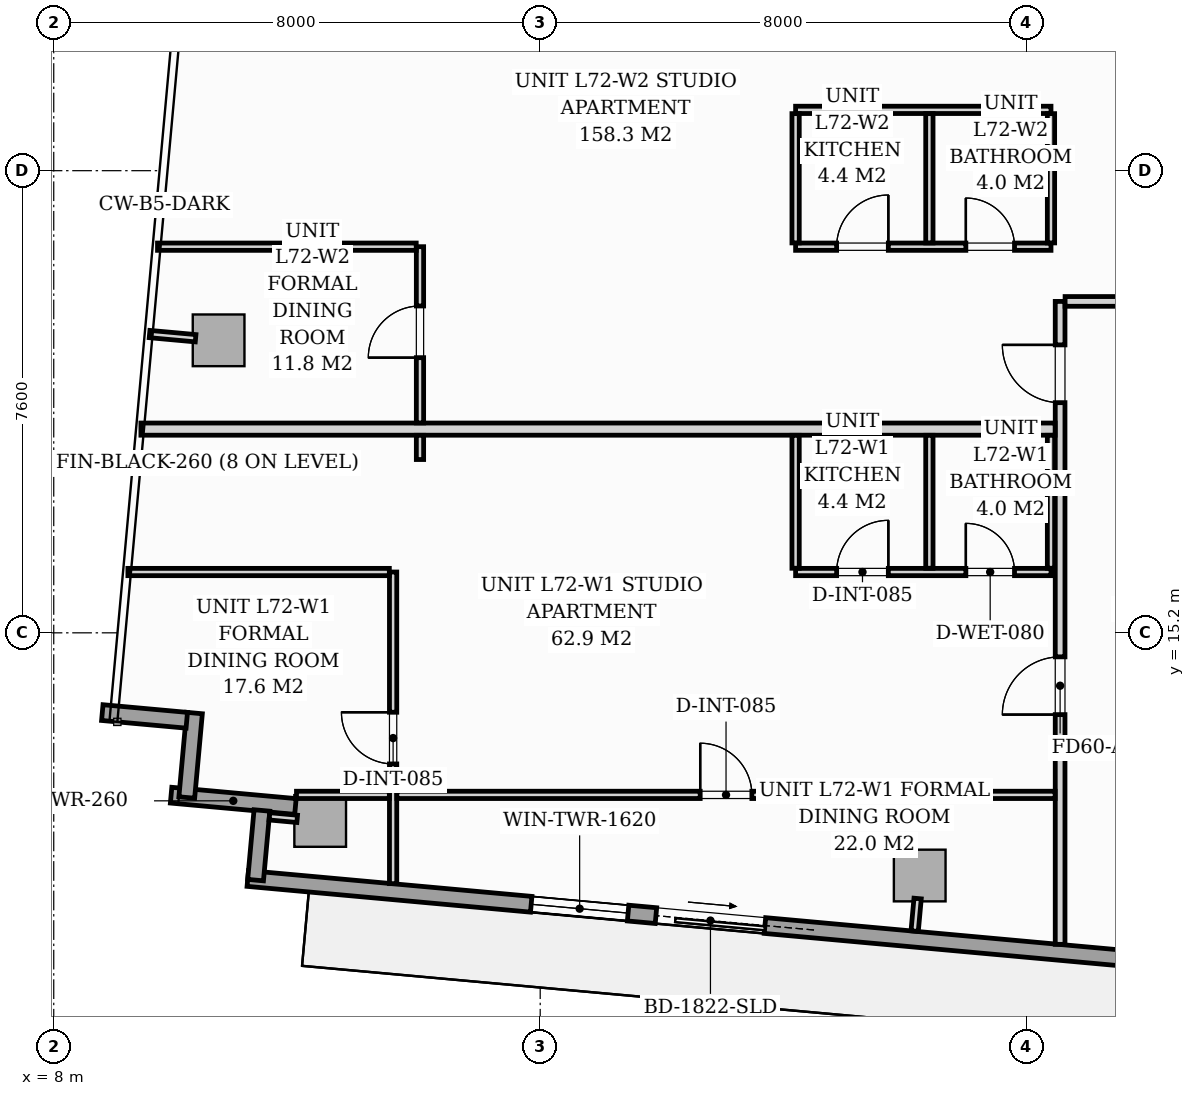
"""IFC4 building model, lengths in metres.
Left out: names, types, materials, properties, quantities, classifications, styles, units other than length and angle.
Written with IfcOpenShell. Run it as: python <this file> out.ifc"""

import sys

from ifc_helpers import new_model, si_unit, direction, frame, frame_2d, origin, origin_2d, place, context, subcontext, project, spatial, rectangle, extrude, source, transform, mapped, element, fill, save


model = new_model("IFC4")
c1 = context("Model", 3, precision=1e-05, world=origin(), true_north=direction((0.0, 1.0)))
c2 = subcontext(c1, "Body", "Model", "MODEL_VIEW")
j1 = project(units=[si_unit("LENGTHUNIT", "METRE"), si_unit("PLANEANGLEUNIT", "RADIAN")], contexts=[c1])
p1 = place(None, origin())
s1 = spatial("IfcSite", under=j1, at=p1, CompositionType="ELEMENT")
p2 = place(p1, origin())
s2 = spatial("IfcBuilding", under=s1, at=p2, CompositionType="ELEMENT")
p3 = place(p2, frame((0.0, 0.0, 249.6)))
s3 = spatial("IfcBuildingStorey", under=s2, at=p3, CompositionType="ELEMENT", Elevation=249.6)
m1 = source(origin(), c2, "Body", "SweptSolid", [
    extrude(rectangle(XDim=0.85, YDim=0.85, at=origin_2d()), origin(), (0.0, 0.0, 1.0), 3.296),
])
for number, where, z_axis, x_axis in (
    (1, (12.382, 12.106, 0.002), (0.0, 0.0, 1.0), (0.996, -0.091, 0.0)),
    (2, (22.241, 11.209, 0.002), (0.0, 0.0, 1.0), (0.996, -0.091, 0.0)),
    (3, (10.711, 20.01, 0.002), (0.0, 0.0, 1.0), (0.996, -0.091, 0.0)),
):
    element("IfcColumn", number, at=place(p3, frame(where, z_axis=z_axis, x_axis=x_axis)), inside=s3, PredefinedType="COLUMN", context=c2, shape_type="MappedRepresentation", body=[
        mapped(m1, transform((0.0, 0.0, 0.0), scale=1.0)),
    ])
p4 = place(p3, frame((11.975, 12.344, 0.0), z_axis=(0.0, 0.0, 1.0), x_axis=(-0.995885404354, 0.090621528316, 0.0)))
e4 = element("IfcWall", 4, at=p4, inside=s3, PredefinedType="STANDARD", context=c2, shape_type="SweptSolid", body=[
    extrude(rectangle(XDim=2.053, YDim=0.26, at=frame_2d((1.026, 0.0))), origin(), (0.0, 0.0, 1.0), 3.04),
])
p5 = place(p3, frame((10.188, 12.492, 0.0), z_axis=(0.0, 0.0, 1.0), x_axis=(0.090646191665, 0.995883159782, 0.0)))
e5 = element("IfcWall", 5, at=p5, inside=s3, PredefinedType="STANDARD", context=c2, shape_type="SweptSolid", body=[
    extrude(rectangle(XDim=1.395, YDim=0.26, at=frame_2d((0.698, 0.0))), origin(), (0.0, 0.0, 1.0), 3.04),
])
p6 = place(p3, frame((10.188, 13.762, 0.0), z_axis=(0.0, 0.0, 1.0), x_axis=(-0.995881721538, 0.090661991521, 0.0)))
e6 = element("IfcWall", 6, at=p6, inside=s3, PredefinedType="STANDARD", context=c2, shape_type="SweptSolid", body=[
    extrude(rectangle(XDim=1.395, YDim=0.26, at=frame_2d((0.698, 0.0))), origin(), (0.0, 0.0, 1.0), 3.04),
])
p7 = place(p3, frame((25.761, 9.834, 0.0), z_axis=(0.0, 0.0, 1.0), x_axis=(-0.995884584572, 0.090630536861, 0.0)))
e7 = element("IfcWall", 7, at=p7, inside=s3, PredefinedType="STANDARD", context=c2, shape_type="SweptSolid", body=[
    extrude(rectangle(XDim=14.63, YDim=0.26, at=frame_2d((7.315, 0.0))), origin(), (0.0, 0.0, 1.0), 3.04),
])
p8 = place(p7, frame((6.09, 0.0, 0.0)))
e8 = element("IfcOpeningElement", 8, at=p8, cuts=e7, PredefinedType="OPENING", context=c2, shape_type="SweptSolid", body=[
    extrude(rectangle(XDim=1.8, YDim=2.06, at=frame_2d((0.9, 1.03))), frame((0.0, 0.14, 0.0), z_axis=(0.0, -1.0, 0.0), x_axis=(1.0, 0.0, 0.0)), (0.0, 0.0, 1.0), 0.28),
])
p9 = place(p7, frame((8.35, 0.0, 0.65)))
e9 = element("IfcOpeningElement", 9, at=p9, cuts=e7, PredefinedType="OPENING", context=c2, shape_type="SweptSolid", body=[
    extrude(rectangle(XDim=1.6, YDim=1.5, at=frame_2d((0.8, 0.75))), frame((0.0, 0.14, 0.0), z_axis=(0.0, -1.0, 0.0), x_axis=(1.0, 0.0, 0.0)), (0.0, 0.0, 1.0), 0.28),
])
p10 = place(p3, frame((11.319, 11.134, 0.0), z_axis=(0.0, 0.0, 1.0), x_axis=(0.090650594353, 0.995882759035, 0.0)))
e10 = element("IfcWall", 10, at=p10, inside=s3, PredefinedType="STANDARD", context=c2, shape_type="SweptSolid", body=[
    extrude(rectangle(XDim=1.15, YDim=0.26, at=frame_2d((0.575, 0.0))), origin(), (0.0, 0.0, 1.0), 3.04),
])
p11 = place(p3, frame((24.55, 13.28, 0.0), z_axis=(0.0, 0.0, 1.0), x_axis=(1.0, 0.0, 0.0)))
e11 = element("IfcWall", 11, at=p11, inside=s3, PredefinedType="PARTITIONING", context=c2, shape_type="SweptSolid", body=[
    extrude(rectangle(XDim=22.9, YDim=0.16, at=frame_2d((11.45, 0.0))), origin(), (0.0, 0.0, 1.0), 2.596),
])
p12 = place(p11, frame((7.125, 0.0, 0.0)))
e12 = element("IfcOpeningElement", 12, at=p12, cuts=e11, PredefinedType="OPENING", context=c2, shape_type="SweptSolid", body=[
    extrude(rectangle(XDim=0.95, YDim=2.06, at=frame_2d((0.475, 1.03))), frame((0.0, 0.09, 0.0), z_axis=(0.0, -1.0, 0.0), x_axis=(1.0, 0.0, 0.0)), (0.0, 0.0, 1.0), 0.18),
])
p13 = place(p3, frame((24.55, 10.077, 0.0), z_axis=(0.0, 0.0, 1.0), x_axis=(0.0, 1.0, 0.0)))
e13 = element("IfcWall", 13, at=p13, inside=s3, PredefinedType="PARTITIONING", context=c2, shape_type="SweptSolid", body=[
    extrude(rectangle(XDim=3.121, YDim=0.16, at=frame_2d((1.561, 0.0))), origin(), (0.0, 0.0, 1.0), 3.04),
])
p14 = place(p3, frame((24.55, 13.362, 0.0), z_axis=(0.0, 0.0, 1.0), x_axis=(0.0, 1.0, 0.0)))
e14 = element("IfcWall", 14, at=p14, inside=s3, PredefinedType="PARTITIONING", context=c2, shape_type="SweptSolid", body=[
    extrude(rectangle(XDim=7.288, YDim=0.16, at=frame_2d((3.644, 0.0))), origin(), (0.0, 0.0, 1.0), 3.04),
])
p15 = place(p14, frame((0.493, 0.0, 0.0)))
e15 = element("IfcOpeningElement", 15, at=p15, cuts=e14, PredefinedType="OPENING", context=c2, shape_type="SweptSolid", body=[
    extrude(rectangle(XDim=0.95, YDim=2.06, at=frame_2d((0.475, 1.03))), frame((0.0, 0.09, 0.0), z_axis=(0.0, -1.0, 0.0), x_axis=(1.0, 0.0, 0.0)), (0.0, 0.0, 1.0), 0.18),
])
p16 = place(p14, frame((5.623, 0.0, 0.0)))
e16 = element("IfcOpeningElement", 16, at=p16, cuts=e14, PredefinedType="OPENING", context=c2, shape_type="SweptSolid", body=[
    extrude(rectangle(XDim=0.95, YDim=2.06, at=frame_2d((0.475, 1.03))), frame((0.0, 0.09, 0.0), z_axis=(0.0, -1.0, 0.0), x_axis=(1.0, 0.0, 0.0)), (0.0, 0.0, 1.0), 0.18),
])
p17 = place(p3, frame((24.632, 20.65, 0.0), z_axis=(0.0, 0.0, 1.0), x_axis=(1.0, 0.0, 0.0)))
e17 = element("IfcWall", 17, at=p17, inside=s3, PredefinedType="PARTITIONING", context=c2, shape_type="SweptSolid", body=[
    extrude(rectangle(XDim=1.566, YDim=0.16, at=frame_2d((0.783, 0.0))), origin(), (0.0, 0.0, 1.0), 3.04),
])
p18 = place(p3, frame((9.434, 18.55, 0.0), z_axis=(0.0, 0.0, 1.0), x_axis=(1.0, 0.0, 0.0)))
e18 = element("IfcWall", 18, at=p18, inside=s3, PredefinedType="PARTITIONING", context=c2, shape_type="SweptSolid", body=[
    extrude(rectangle(XDim=15.034, YDim=0.2, at=frame_2d((7.517, 0.0))), origin(), (0.0, 0.0, 1.0), 2.381),
])
p19 = place(p3, frame((20.2, 16.2, 0.0), z_axis=(0.0, 0.0, 1.0), x_axis=(1.0, 0.0, 0.0)))
e19 = element("IfcWall", 19, at=p19, inside=s3, PredefinedType="PARTITIONING", context=c2, shape_type="SweptSolid", body=[
    extrude(rectangle(XDim=4.2, YDim=0.12, at=frame_2d((2.1, 0.0))), origin(), (0.0, 0.0, 1.0), 3.04),
])
p20 = place(p19, frame((0.675, 0.0, 0.0)))
e20 = element("IfcOpeningElement", 20, at=p20, cuts=e19, PredefinedType="OPENING", context=c2, shape_type="SweptSolid", body=[
    extrude(rectangle(XDim=0.85, YDim=2.05, at=frame_2d((0.425, 1.025))), frame((0.0, 0.07, 0.0), z_axis=(0.0, -1.0, 0.0), x_axis=(1.0, 0.0, 0.0)), (0.0, 0.0, 1.0), 0.14),
])
p21 = place(p19, frame((2.8, 0.0, 0.0)))
e21 = element("IfcOpeningElement", 21, at=p21, cuts=e19, PredefinedType="OPENING", context=c2, shape_type="SweptSolid", body=[
    extrude(rectangle(XDim=0.8, YDim=2.02, at=frame_2d((0.4, 1.01))), frame((0.0, 0.07, 0.0), z_axis=(0.0, -1.0, 0.0), x_axis=(1.0, 0.0, 0.0)), (0.0, 0.0, 1.0), 0.14),
])
for number, where, z_axis, x_axis in (
    (22, (20.2, 16.262, 0.0), (0.0, 0.0, 1.0), (0.0, 1.0, 0.0)),
    (23, (22.4, 16.262, 0.0), (0.0, 0.0, 1.0), (0.0, 1.0, 0.0)),
    (24, (24.4, 16.262, 0.0), (0.0, 0.0, 1.0), (0.0, 1.0, 0.0)),
):
    element("IfcWall", number, at=place(p3, frame(where, z_axis=z_axis, x_axis=x_axis)), inside=s3, PredefinedType="PARTITIONING", context=c2, shape_type="SweptSolid", body=[
        extrude(rectangle(XDim=2.186, YDim=0.12, at=frame_2d((1.093, 0.0))), origin(), (0.0, 0.0, 1.0), 3.04),
    ])
p22 = place(p3, frame((13.581, 11.075, 0.0), z_axis=(0.0, 0.0, 1.0), x_axis=(0.0, 1.0, 0.0)))
e25 = element("IfcWall", 25, at=p22, inside=s3, PredefinedType="PARTITIONING", context=c2, shape_type="SweptSolid", body=[
    extrude(rectangle(XDim=5.125, YDim=0.12, at=frame_2d((2.562, 0.0))), origin(), (0.0, 0.0, 1.0), 3.04),
])
p23 = place(p22, frame((1.969, 0.0, 0.0)))
e26 = element("IfcOpeningElement", 26, at=p23, cuts=e25, PredefinedType="OPENING", context=c2, shape_type="SweptSolid", body=[
    extrude(rectangle(XDim=0.85, YDim=2.05, at=frame_2d((0.425, 1.025))), frame((0.0, 0.07, 0.0), z_axis=(0.0, -1.0, 0.0), x_axis=(1.0, 0.0, 0.0)), (0.0, 0.0, 1.0), 0.14),
])
p24 = place(p3, frame((9.22, 16.2, 0.0), z_axis=(0.0, 0.0, 1.0), x_axis=(1.0, 0.0, 0.0)))
e27 = element("IfcWall", 27, at=p24, inside=s3, PredefinedType="PARTITIONING", context=c2, shape_type="SweptSolid", body=[
    extrude(rectangle(XDim=4.299, YDim=0.12, at=frame_2d((2.149, 0.0))), origin(), (0.0, 0.0, 1.0), 3.04),
])
p25 = place(p3, frame((11.992, 12.535, 0.0), z_axis=(0.0, 0.0, 1.0), x_axis=(1.0, 0.0, 0.0)))
e28 = element("IfcWall", 28, at=p25, inside=s3, PredefinedType="PARTITIONING", context=c2, shape_type="SweptSolid", body=[
    extrude(rectangle(XDim=1.527, YDim=0.12, at=frame_2d((0.763, 0.0))), origin(), (0.0, 0.0, 1.0), 3.04),
])
p26 = place(p3, frame((13.643, 12.535, 0.0), z_axis=(0.0, 0.0, 1.0), x_axis=(1.0, 0.0, 0.0)))
e29 = element("IfcWall", 29, at=p26, inside=s3, PredefinedType="PARTITIONING", context=c2, shape_type="SweptSolid", body=[
    extrude(rectangle(XDim=10.825, YDim=0.12, at=frame_2d((5.413, 0.0))), origin(), (0.0, 0.0, 1.0), 3.04),
])
p27 = place(p26, frame((4.988, 0.0, 0.0)))
e30 = element("IfcOpeningElement", 30, at=p27, cuts=e29, PredefinedType="OPENING", context=c2, shape_type="SweptSolid", body=[
    extrude(rectangle(XDim=0.85, YDim=2.05, at=frame_2d((0.425, 1.025))), frame((0.0, 0.07, 0.0), z_axis=(0.0, -1.0, 0.0), x_axis=(1.0, 0.0, 0.0)), (0.0, 0.0, 1.0), 0.14),
])
p28 = place(p3, frame((20.2, 21.55, 0.0), z_axis=(0.0, 0.0, 1.0), x_axis=(1.0, 0.0, 0.0)))
e31 = element("IfcWall", 31, at=p28, inside=s3, PredefinedType="PARTITIONING", context=c2, shape_type="SweptSolid", body=[
    extrude(rectangle(XDim=4.2, YDim=0.12, at=frame_2d((2.1, 0.0))), origin(), (0.0, 0.0, 1.0), 3.04),
])
p29 = place(p28, frame((0.675, 0.0, 0.0)))
e32 = element("IfcOpeningElement", 32, at=p29, cuts=e31, PredefinedType="OPENING", context=c2, shape_type="SweptSolid", body=[
    extrude(rectangle(XDim=0.85, YDim=2.05, at=frame_2d((0.425, 1.025))), frame((0.0, 0.07, 0.0), z_axis=(0.0, -1.0, 0.0), x_axis=(1.0, 0.0, 0.0)), (0.0, 0.0, 1.0), 0.14),
])
p30 = place(p28, frame((2.8, 0.0, 0.0)))
e33 = element("IfcOpeningElement", 33, at=p30, cuts=e31, PredefinedType="OPENING", context=c2, shape_type="SweptSolid", body=[
    extrude(rectangle(XDim=0.8, YDim=2.02, at=frame_2d((0.4, 1.01))), frame((0.0, 0.07, 0.0), z_axis=(0.0, -1.0, 0.0), x_axis=(1.0, 0.0, 0.0)), (0.0, 0.0, 1.0), 0.14),
])
p31 = place(p3, frame((20.2, 23.8, 0.0), z_axis=(0.0, 0.0, 1.0), x_axis=(1.0, 0.0, 0.0)))
e34 = element("IfcWall", 34, at=p31, inside=s3, PredefinedType="PARTITIONING", context=c2, shape_type="SweptSolid", body=[
    extrude(rectangle(XDim=4.2, YDim=0.12, at=frame_2d((2.1, 0.0))), origin(), (0.0, 0.0, 1.0), 3.04),
])
for number, where, z_axis, x_axis in (
    (35, (20.2, 21.612, 0.0), (0.0, 0.0, 1.0), (0.0, 1.0, 0.0)),
    (36, (22.4, 21.612, 0.0), (0.0, 0.0, 1.0), (0.0, 1.0, 0.0)),
    (37, (24.4, 21.612, 0.0), (0.0, 0.0, 1.0), (0.0, 1.0, 0.0)),
):
    element("IfcWall", number, at=place(p3, frame(where, z_axis=z_axis, x_axis=x_axis)), inside=s3, PredefinedType="PARTITIONING", context=c2, shape_type="SweptSolid", body=[
        extrude(rectangle(XDim=2.126, YDim=0.12, at=frame_2d((1.063, 0.0))), origin(), (0.0, 0.0, 1.0), 3.04),
    ])
p32 = place(p3, frame((14.023, 18.05, 0.0), z_axis=(0.0, 0.0, 1.0), x_axis=(0.0, 1.0, 0.0)))
e38 = element("IfcWall", 38, at=p32, inside=s3, PredefinedType="PARTITIONING", context=c2, shape_type="SweptSolid", body=[
    extrude(rectangle(XDim=0.398, YDim=0.12, at=frame_2d((0.199, 0.0))), origin(), (0.0, 0.0, 1.0), 3.04),
])
p33 = place(p3, frame((14.023, 18.652, 0.0), z_axis=(0.0, 0.0, 1.0), x_axis=(0.0, 1.0, 0.0)))
e39 = element("IfcWall", 39, at=p33, inside=s3, PredefinedType="PARTITIONING", context=c2, shape_type="SweptSolid", body=[
    extrude(rectangle(XDim=2.898, YDim=0.12, at=frame_2d((1.449, 0.0))), origin(), (0.0, 0.0, 1.0), 3.04),
])
p34 = place(p33, frame((1.073, 0.0, 0.0)))
e40 = element("IfcOpeningElement", 40, at=p34, cuts=e39, PredefinedType="OPENING", context=c2, shape_type="SweptSolid", body=[
    extrude(rectangle(XDim=0.85, YDim=2.05, at=frame_2d((0.425, 1.025))), frame((0.0, 0.07, 0.0), z_axis=(0.0, -1.0, 0.0), x_axis=(1.0, 0.0, 0.0)), (0.0, 0.0, 1.0), 0.14),
])
p35 = place(p3, frame((9.707, 21.55, 0.0), z_axis=(0.0, 0.0, 1.0), x_axis=(1.0, 0.0, 0.0)))
e41 = element("IfcWall", 41, at=p35, inside=s3, PredefinedType="PARTITIONING", context=c2, shape_type="SweptSolid", body=[
    extrude(rectangle(XDim=4.254, YDim=0.12, at=frame_2d((2.127, 0.0))), origin(), (0.0, 0.0, 1.0), 3.04),
])
p36 = place(p3, frame((12.003, 12.141, 0.0), z_axis=(0.0, 0.0, 1.0), x_axis=(-0.995884462012, 0.090631883588, 0.0)))
e42 = element("IfcWall", 42, at=p36, inside=s3, PredefinedType="PARTITIONING", context=c2, shape_type="SweptSolid", body=[
    extrude(rectangle(XDim=0.458, YDim=0.12, at=frame_2d((0.229, 0.0))), origin(), (0.0, 0.0, 1.0), 3.04),
])
p37 = place(p3, frame((22.207, 10.831, 0.0), z_axis=(0.0, 0.0, 1.0), x_axis=(-0.090781299264, -0.995870852924, 0.0)))
e43 = element("IfcWall", 43, at=p37, inside=s3, PredefinedType="PARTITIONING", context=c2, shape_type="SweptSolid", body=[
    extrude(rectangle(XDim=0.538, YDim=0.12, at=frame_2d((0.269, 0.0))), origin(), (0.0, 0.0, 1.0), 3.04),
])
p38 = place(p3, frame((10.333, 20.045, 0.0), z_axis=(0.0, 0.0, 1.0), x_axis=(-0.995890573658, 0.09056470228, 0.0)))
e44 = element("IfcWall", 44, at=p38, inside=s3, PredefinedType="PARTITIONING", context=c2, shape_type="SweptSolid", body=[
    extrude(rectangle(XDim=0.76, YDim=0.12, at=frame_2d((0.38, 0.0))), origin(), (0.0, 0.0, 1.0), 3.04),
])
m2 = source(origin(), c2, "Body", "SweptSolid", [
    extrude(rectangle(XDim=1.8, YDim=2.06, at=frame_2d((0.9, 1.03))), frame((0.0, 0.025, 0.0), z_axis=(0.0, -1.0, 0.0), x_axis=(1.0, 0.0, 0.0)), (0.0, 0.0, 1.0), 0.05),
])
p39 = place(p8, origin())
e45 = element("IfcDoor", 45, at=p39, inside=s3, OperationType="SLIDING_TO_LEFT", PredefinedType="DOOR", context=c2, shape_type="MappedRepresentation", body=[
    mapped(m2, transform((0.0, 0.0, 0.0), scale=1.0)),
])
fill(e8, e45)
m3 = source(origin(), c2, "Body", "SweptSolid", [
    extrude(rectangle(XDim=1.6, YDim=1.5, at=frame_2d((0.8, 0.75))), frame((0.0, 0.03, 0.0), z_axis=(0.0, -1.0, 0.0), x_axis=(1.0, 0.0, 0.0)), (0.0, 0.0, 1.0), 0.06),
])
p40 = place(p9, origin())
e46 = element("IfcWindow", 46, at=p40, inside=s3, PartitioningType="SINGLE_PANEL", PredefinedType="WINDOW", context=c2, shape_type="MappedRepresentation", body=[
    mapped(m3, transform((0.0, 0.0, 0.0), scale=1.0)),
])
fill(e9, e46)
m4 = source(origin(), c2, "Body", "SweptSolid", [
    extrude(rectangle(XDim=0.95, YDim=2.06, at=frame_2d((0.475, 1.03))), frame((0.0, 0.025, 0.0), z_axis=(0.0, -1.0, 0.0), x_axis=(1.0, 0.0, 0.0)), (0.0, 0.0, 1.0), 0.05),
])
p41 = place(p15, origin())
e47 = element("IfcDoor", 47, at=p41, inside=s3, OperationType="SINGLE_SWING_LEFT", PredefinedType="DOOR", context=c2, shape_type="MappedRepresentation", body=[
    mapped(m4, transform((0.0, 0.0, 0.0), scale=1.0)),
])
fill(e15, e47)
m5 = source(origin(), c2, "Body", "SweptSolid", [
    extrude(rectangle(XDim=0.85, YDim=2.05, at=frame_2d((0.425, 1.025))), frame((0.0, 0.025, 0.0), z_axis=(0.0, -1.0, 0.0), x_axis=(1.0, 0.0, 0.0)), (0.0, 0.0, 1.0), 0.05),
])
p42 = place(p23, origin())
e48 = element("IfcDoor", 48, at=p42, inside=s3, OperationType="SINGLE_SWING_RIGHT", PredefinedType="DOOR", context=c2, shape_type="MappedRepresentation", body=[
    mapped(m5, transform((0.0, 0.0, 0.0), scale=1.0)),
])
fill(e26, e48)
p43 = place(p27, origin())
e49 = element("IfcDoor", 49, at=p43, inside=s3, OperationType="SINGLE_SWING_LEFT", PredefinedType="DOOR", context=c2, shape_type="MappedRepresentation", body=[
    mapped(m5, transform((0.0, 0.0, 0.0), scale=1.0)),
])
fill(e30, e49)
p44 = place(p20, origin())
e50 = element("IfcDoor", 50, at=p44, inside=s3, OperationType="SINGLE_SWING_RIGHT", PredefinedType="DOOR", context=c2, shape_type="MappedRepresentation", body=[
    mapped(m5, transform((0.0, 0.0, 0.0), scale=1.0)),
])
fill(e20, e50)
m6 = source(origin(), c2, "Body", "SweptSolid", [
    extrude(rectangle(XDim=0.8, YDim=2.02, at=frame_2d((0.4, 1.01))), frame((0.0, 0.025, 0.0), z_axis=(0.0, -1.0, 0.0), x_axis=(1.0, 0.0, 0.0)), (0.0, 0.0, 1.0), 0.05),
])
p45 = place(p21, origin())
e51 = element("IfcDoor", 51, at=p45, inside=s3, OperationType="SINGLE_SWING_LEFT", PredefinedType="DOOR", context=c2, shape_type="MappedRepresentation", body=[
    mapped(m6, transform((0.0, 0.0, 0.0), scale=1.0)),
])
fill(e21, e51)
p46 = place(p16, origin())
e52 = element("IfcDoor", 52, at=p46, inside=s3, OperationType="SINGLE_SWING_RIGHT", PredefinedType="DOOR", context=c2, shape_type="MappedRepresentation", body=[
    mapped(m4, transform((0.0, 0.0, 0.0), scale=1.0)),
])
fill(e16, e52)
p47 = place(p34, origin())
e53 = element("IfcDoor", 53, at=p47, inside=s3, OperationType="SINGLE_SWING_LEFT", PredefinedType="DOOR", context=c2, shape_type="MappedRepresentation", body=[
    mapped(m5, transform((0.0, 0.0, 0.0), scale=1.0)),
])
fill(e40, e53)
p48 = place(p29, origin())
e54 = element("IfcDoor", 54, at=p48, inside=s3, OperationType="SINGLE_SWING_RIGHT", PredefinedType="DOOR", context=c2, shape_type="MappedRepresentation", body=[
    mapped(m5, transform((0.0, 0.0, 0.0), scale=1.0)),
])
fill(e32, e54)
p49 = place(p30, origin())
e55 = element("IfcDoor", 55, at=p49, inside=s3, OperationType="SINGLE_SWING_LEFT", PredefinedType="DOOR", context=c2, shape_type="MappedRepresentation", body=[
    mapped(m6, transform((0.0, 0.0, 0.0), scale=1.0)),
])
fill(e33, e55)
save(model, sys.argv[1])
